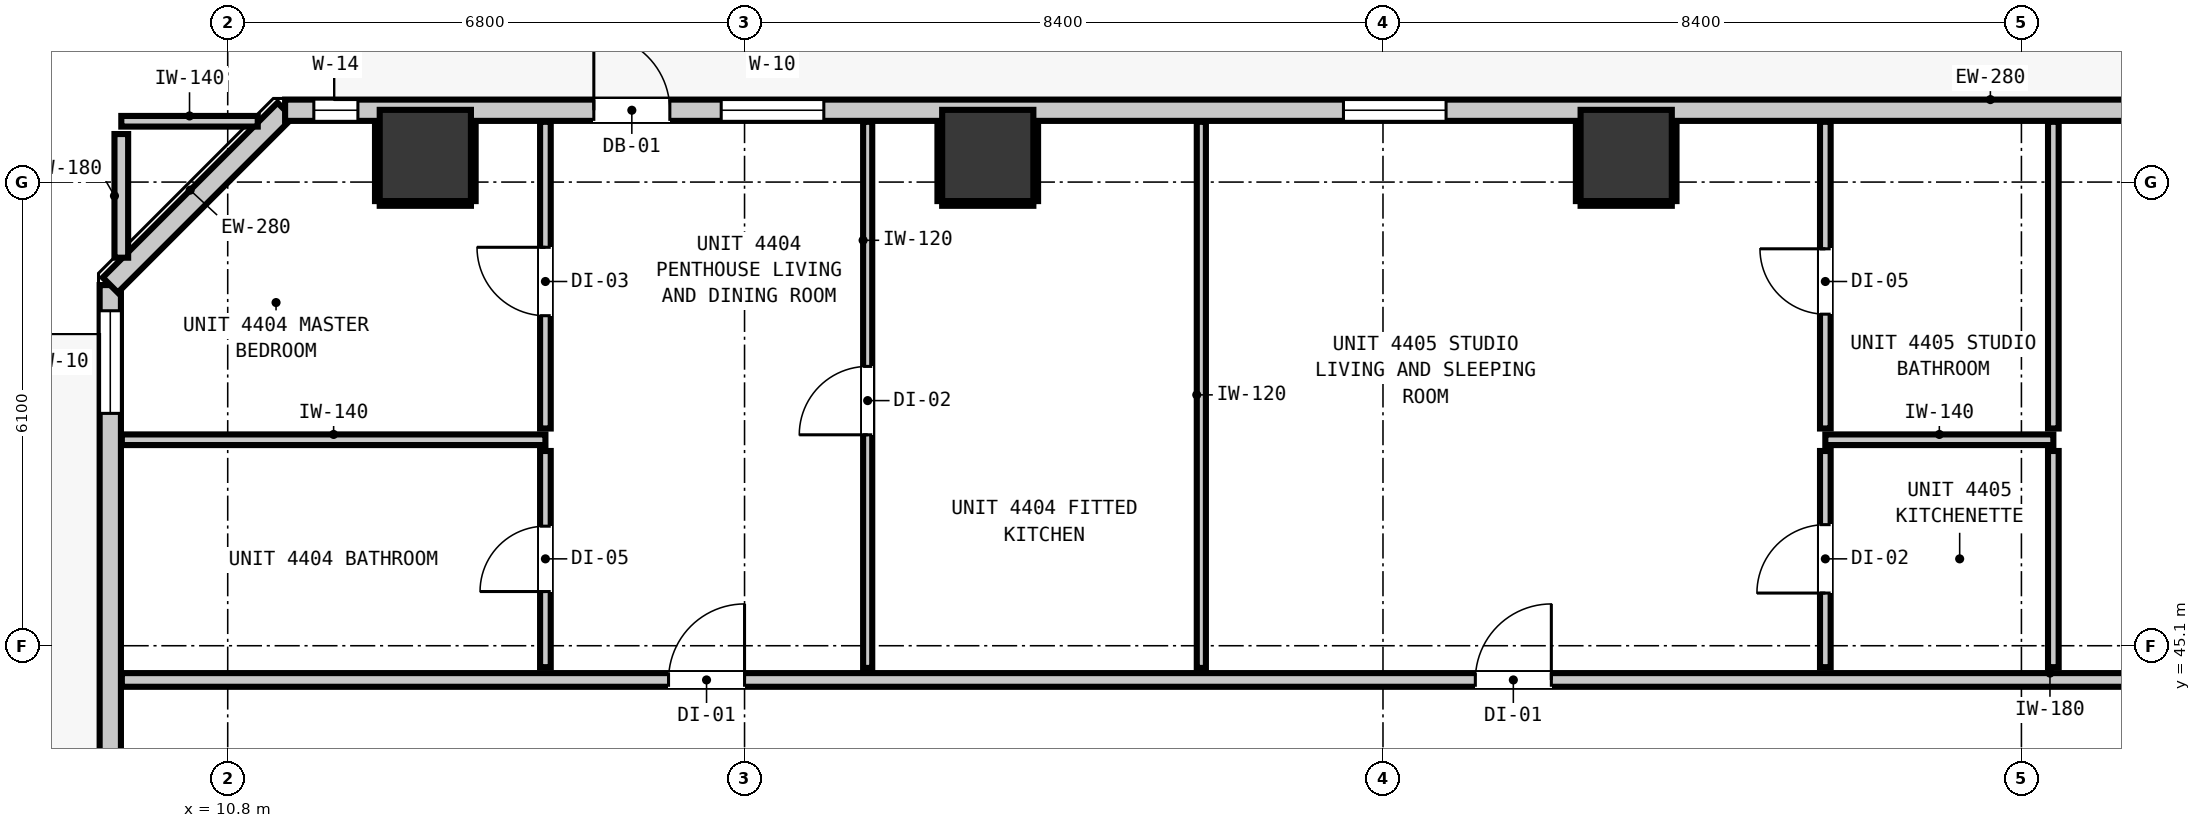
"""IFC4 building model, lengths in metres.
Left out: names, types, materials, properties, quantities, classifications, styles, units other than length and angle.
Written with IfcOpenShell. Run it as: python <this file> out.ifc"""

import sys

from ifc_helpers import new_model, si_unit, direction, frame, frame_2d, origin, origin_2d, place, context, subcontext, project, spatial, rectangle, extrude, element, fill, save


model = new_model("IFC4")
c1 = context("Model", 3, precision=1e-05, world=origin(), true_north=direction((0.0, 1.0)))
c2 = subcontext(c1, "Body", "Model", "MODEL_VIEW")
j1 = project(units=[si_unit("LENGTHUNIT", "METRE"), si_unit("PLANEANGLEUNIT", "RADIAN")], contexts=[c1])
p1 = place(None, origin())
s1 = spatial("IfcSite", under=j1, at=p1, CompositionType="ELEMENT")
p2 = place(p1, origin())
s2 = spatial("IfcBuilding", under=s1, at=p2, CompositionType="ELEMENT")
p3 = place(p2, frame((0.0, 0.0, 152.56)))
s3 = spatial("IfcBuildingStorey", under=s2, at=p3, CompositionType="ELEMENT", Elevation=152.56)
for number, where, z_axis, x_axis in (
    (1, (13.4, 51.55, 0.0), (0.0, 0.0, 1.0), (1.0, 0.0, 0.0)),
    (2, (20.8, 51.55, 0.0), (0.0, 0.0, 1.0), (1.0, 0.0, 0.0)),
    (3, (29.2, 51.55, 0.0), (0.0, 0.0, 1.0), (1.0, 0.0, 0.0)),
):
    element("IfcColumn", number, at=place(p3, frame(where, z_axis=z_axis, x_axis=x_axis)), inside=s3, PredefinedType="COLUMN", context=c2, shape_type="SweptSolid", body=[
        extrude(rectangle(XDim=1.2, YDim=1.2, at=origin_2d()), origin(), (0.0, 0.0, 1.0), 3.32),
    ])
p4 = place(p3, frame((9.255, 17.555, 0.0), z_axis=(0.0, 0.0, 1.0), x_axis=(0.0, 1.0, 0.0)))
e4 = element("IfcWall", 4, at=p4, inside=s3, PredefinedType="STANDARD", context=c2, shape_type="SweptSolid", body=[
    extrude(rectangle(XDim=32.29, YDim=0.28, at=frame_2d((16.145, 0.0))), origin(), (0.0, 0.0, 1.0), 3.08),
])
p5 = place(p4, frame((5.467, 0.0, 0.0)))
e5 = element("IfcOpeningElement", 5, at=p5, cuts=e4, PredefinedType="OPENING", context=c2, shape_type="SweptSolid", body=[
    extrude(rectangle(XDim=1.0, YDim=2.15, at=frame_2d((0.5, 1.075))), frame((0.0, 0.15, 0.0), z_axis=(0.0, -1.0, 0.0), x_axis=(1.0, 0.0, 0.0)), (0.0, 0.0, 1.0), 0.3),
])
p6 = place(p4, frame((30.602, 0.0, 0.85)))
e6 = element("IfcOpeningElement", 6, at=p6, cuts=e4, PredefinedType="OPENING", context=c2, shape_type="SweptSolid", body=[
    extrude(rectangle(XDim=1.35, YDim=1.85, at=frame_2d((0.675, 0.925))), frame((0.0, 0.15, 0.0), z_axis=(0.0, -1.0, 0.0), x_axis=(1.0, 0.0, 0.0)), (0.0, 0.0, 1.0), 0.3),
])
p7 = place(p3, frame((9.255, 49.845, 0.0), z_axis=(0.0, 0.0, 1.0), x_axis=(0.707106781187, 0.707106781187, 0.0)))
e7 = element("IfcWall", 7, at=p7, inside=s3, PredefinedType="STANDARD", context=c2, shape_type="SweptSolid", body=[
    extrude(rectangle(XDim=3.253, YDim=0.28, at=frame_2d((1.626, 0.0))), origin(), (0.0, 0.0, 1.0), 3.08),
])
p8 = place(p3, frame((11.555, 52.145, 0.0), z_axis=(0.0, 0.0, 1.0), x_axis=(1.0, 0.0, 0.0)))
e8 = element("IfcWall", 8, at=p8, inside=s3, PredefinedType="STANDARD", context=c2, shape_type="SweptSolid", body=[
    extrude(rectangle(XDim=35.09, YDim=0.28, at=frame_2d((17.545, 0.0))), origin(), (0.0, 0.0, 1.0), 3.08),
])
p9 = place(p8, frame((4.062, 0.0, 0.0)))
e9 = element("IfcOpeningElement", 9, at=p9, cuts=e8, PredefinedType="OPENING", context=c2, shape_type="SweptSolid", body=[
    extrude(rectangle(XDim=1.0, YDim=2.15, at=frame_2d((0.5, 1.075))), frame((0.0, 0.15, 0.0), z_axis=(0.0, -1.0, 0.0), x_axis=(1.0, 0.0, 0.0)), (0.0, 0.0, 1.0), 0.3),
])
p10 = place(p8, frame((5.738, 0.0, 0.85)))
e10 = element("IfcOpeningElement", 10, at=p10, cuts=e8, PredefinedType="OPENING", context=c2, shape_type="SweptSolid", body=[
    extrude(rectangle(XDim=1.35, YDim=1.85, at=frame_2d((0.675, 0.925))), frame((0.0, 0.15, 0.0), z_axis=(0.0, -1.0, 0.0), x_axis=(1.0, 0.0, 0.0)), (0.0, 0.0, 1.0), 0.3),
])
p11 = place(p8, frame((0.378, 0.0, 0.85)))
e11 = element("IfcOpeningElement", 11, at=p11, cuts=e8, PredefinedType="OPENING", context=c2, shape_type="SweptSolid", body=[
    extrude(rectangle(XDim=0.58, YDim=1.5, at=frame_2d((0.29, 0.75))), frame((0.0, 0.15, 0.0), z_axis=(0.0, -1.0, 0.0), x_axis=(1.0, 0.0, 0.0)), (0.0, 0.0, 1.0), 0.3),
])
p12 = place(p8, frame((13.925, 0.0, 0.85)))
e12 = element("IfcOpeningElement", 12, at=p12, cuts=e8, PredefinedType="OPENING", context=c2, shape_type="SweptSolid", body=[
    extrude(rectangle(XDim=1.35, YDim=1.85, at=frame_2d((0.675, 0.925))), frame((0.0, 0.15, 0.0), z_axis=(0.0, -1.0, 0.0), x_axis=(1.0, 0.0, 0.0)), (0.0, 0.0, 1.0), 0.3),
])
p13 = place(p8, frame((29.598, 0.0, 0.85)))
e13 = element("IfcOpeningElement", 13, at=p13, cuts=e8, PredefinedType="OPENING", context=c2, shape_type="SweptSolid", body=[
    extrude(rectangle(XDim=1.35, YDim=1.85, at=frame_2d((0.675, 0.925))), frame((0.0, 0.15, 0.0), z_axis=(0.0, -1.0, 0.0), x_axis=(1.0, 0.0, 0.0)), (0.0, 0.0, 1.0), 0.3),
])
p14 = place(p3, frame((9.407, 44.65, 0.0), z_axis=(0.0, 0.0, 1.0), x_axis=(1.0, 0.0, 0.0)))
e14 = element("IfcWall", 14, at=p14, inside=s3, PredefinedType="PARTITIONING", context=c2, shape_type="SweptSolid", body=[
    extrude(rectangle(XDim=39.386, YDim=0.18, at=frame_2d((19.693, 0.0))), origin(), (0.0, 0.0, 1.0), 3.08),
])
p15 = place(p14, frame((7.193, 0.0, 0.0)))
e15 = element("IfcOpeningElement", 15, at=p15, cuts=e14, PredefinedType="OPENING", context=c2, shape_type="SweptSolid", body=[
    extrude(rectangle(XDim=1.0, YDim=2.15, at=frame_2d((0.5, 1.075))), frame((0.0, 0.1, 0.0), z_axis=(0.0, -1.0, 0.0), x_axis=(1.0, 0.0, 0.0)), (0.0, 0.0, 1.0), 0.2),
])
p16 = place(p14, frame((17.808, 0.0, 0.0)))
e16 = element("IfcOpeningElement", 16, at=p16, cuts=e14, PredefinedType="OPENING", context=c2, shape_type="SweptSolid", body=[
    extrude(rectangle(XDim=1.0, YDim=2.15, at=frame_2d((0.5, 1.075))), frame((0.0, 0.1, 0.0), z_axis=(0.0, -1.0, 0.0), x_axis=(1.0, 0.0, 0.0)), (0.0, 0.0, 1.0), 0.2),
])
p17 = place(p14, frame((31.929, 0.0, 0.0)))
e17 = element("IfcOpeningElement", 17, at=p17, cuts=e14, PredefinedType="OPENING", context=c2, shape_type="SweptSolid", body=[
    extrude(rectangle(XDim=0.9, YDim=2.1, at=frame_2d((0.45, 1.05))), frame((0.0, 0.1, 0.0), z_axis=(0.0, -1.0, 0.0), x_axis=(1.0, 0.0, 0.0)), (0.0, 0.0, 1.0), 0.2),
])
p18 = place(p3, frame((9.407, 47.81, 0.0), z_axis=(0.0, 0.0, 1.0), x_axis=(1.0, 0.0, 0.0)))
e18 = element("IfcWall", 18, at=p18, inside=s3, PredefinedType="PARTITIONING", context=c2, shape_type="SweptSolid", body=[
    extrude(rectangle(XDim=5.573, YDim=0.14, at=frame_2d((2.787, 0.0))), origin(), (0.0, 0.0, 1.0), 3.08),
])
p19 = place(p3, frame((31.82, 47.81, 0.0), z_axis=(0.0, 0.0, 1.0), x_axis=(1.0, 0.0, 0.0)))
e19 = element("IfcWall", 19, at=p19, inside=s3, PredefinedType="PARTITIONING", context=c2, shape_type="SweptSolid", body=[
    extrude(rectangle(XDim=3.0, YDim=0.14, at=frame_2d((1.5, 0.0))), origin(), (0.0, 0.0, 1.0), 3.08),
])
p20 = place(p3, frame((9.4, 52.0, 0.0), z_axis=(0.0, 0.0, 1.0), x_axis=(1.0, 0.0, 0.0)))
e20 = element("IfcWall", 20, at=p20, inside=s3, PredefinedType="PARTITIONING", context=c2, shape_type="SweptSolid", body=[
    extrude(rectangle(XDim=1.795, YDim=0.14, at=frame_2d((0.897, 0.0))), origin(), (0.0, 0.0, 1.0), 3.08),
])
p21 = place(p3, frame((9.4, 50.205, 0.0), z_axis=(0.0, 0.0, 1.0), x_axis=(0.0, 1.0, 0.0)))
e21 = element("IfcWall", 21, at=p21, inside=s3, PredefinedType="PARTITIONING", context=c2, shape_type="SweptSolid", body=[
    extrude(rectangle(XDim=1.627, YDim=0.18, at=frame_2d((0.813, 0.0))), origin(), (0.0, 0.0, 1.0), 3.08),
])
p22 = place(p3, frame((14.98, 44.818, 0.0), z_axis=(0.0, 0.0, 1.0), x_axis=(0.0, 1.0, 0.0)))
e22 = element("IfcWall", 22, at=p22, inside=s3, PredefinedType="PARTITIONING", context=c2, shape_type="SweptSolid", body=[
    extrude(rectangle(XDim=2.844, YDim=0.14, at=frame_2d((1.422, 0.0))), origin(), (0.0, 0.0, 1.0), 3.08),
])
p23 = place(p22, frame((0.995, 0.0, 0.0)))
e23 = element("IfcOpeningElement", 23, at=p23, cuts=e22, PredefinedType="OPENING", context=c2, shape_type="SweptSolid", body=[
    extrude(rectangle(XDim=0.86, YDim=2.02, at=frame_2d((0.43, 1.01))), frame((0.0, 0.08, 0.0), z_axis=(0.0, -1.0, 0.0), x_axis=(1.0, 0.0, 0.0)), (0.0, 0.0, 1.0), 0.16),
])
p24 = place(p3, frame((14.98, 47.958, 0.0), z_axis=(0.0, 0.0, 1.0), x_axis=(0.0, 1.0, 0.0)))
e24 = element("IfcWall", 24, at=p24, inside=s3, PredefinedType="PARTITIONING", context=c2, shape_type="SweptSolid", body=[
    extrude(rectangle(XDim=4.035, YDim=0.14, at=frame_2d((2.018, 0.0))), origin(), (0.0, 0.0, 1.0), 3.08),
])
p25 = place(p24, frame((1.484, 0.0, 0.0)))
e25 = element("IfcOpeningElement", 25, at=p25, cuts=e24, PredefinedType="OPENING", context=c2, shape_type="SweptSolid", body=[
    extrude(rectangle(XDim=0.9, YDim=2.1, at=frame_2d((0.45, 1.05))), frame((0.0, 0.08, 0.0), z_axis=(0.0, -1.0, 0.0), x_axis=(1.0, 0.0, 0.0)), (0.0, 0.0, 1.0), 0.16),
])
p26 = place(p3, frame((31.82, 44.818, 0.0), z_axis=(0.0, 0.0, 1.0), x_axis=(0.0, 1.0, 0.0)))
e26 = element("IfcWall", 26, at=p26, inside=s3, PredefinedType="PARTITIONING", context=c2, shape_type="SweptSolid", body=[
    extrude(rectangle(XDim=2.844, YDim=0.14, at=frame_2d((1.422, 0.0))), origin(), (0.0, 0.0, 1.0), 3.08),
])
p27 = place(p26, frame((0.975, 0.0, 0.0)))
e27 = element("IfcOpeningElement", 27, at=p27, cuts=e26, PredefinedType="OPENING", context=c2, shape_type="SweptSolid", body=[
    extrude(rectangle(XDim=0.9, YDim=2.1, at=frame_2d((0.45, 1.05))), frame((0.0, 0.08, 0.0), z_axis=(0.0, -1.0, 0.0), x_axis=(1.0, 0.0, 0.0)), (0.0, 0.0, 1.0), 0.16),
])
p28 = place(p3, frame((31.82, 47.958, 0.0), z_axis=(0.0, 0.0, 1.0), x_axis=(0.0, 1.0, 0.0)))
e28 = element("IfcWall", 28, at=p28, inside=s3, PredefinedType="PARTITIONING", context=c2, shape_type="SweptSolid", body=[
    extrude(rectangle(XDim=4.035, YDim=0.14, at=frame_2d((2.018, 0.0))), origin(), (0.0, 0.0, 1.0), 3.08),
])
p29 = place(p28, frame((1.504, 0.0, 0.0)))
e29 = element("IfcOpeningElement", 29, at=p29, cuts=e28, PredefinedType="OPENING", context=c2, shape_type="SweptSolid", body=[
    extrude(rectangle(XDim=0.86, YDim=2.02, at=frame_2d((0.43, 1.01))), frame((0.0, 0.08, 0.0), z_axis=(0.0, -1.0, 0.0), x_axis=(1.0, 0.0, 0.0)), (0.0, 0.0, 1.0), 0.16),
])
p30 = place(p3, frame((34.82, 44.818, 0.0), z_axis=(0.0, 0.0, 1.0), x_axis=(0.0, 1.0, 0.0)))
e30 = element("IfcWall", 30, at=p30, inside=s3, PredefinedType="PARTITIONING", context=c2, shape_type="SweptSolid", body=[
    extrude(rectangle(XDim=2.844, YDim=0.14, at=frame_2d((1.422, 0.0))), origin(), (0.0, 0.0, 1.0), 3.08),
])
p31 = place(p3, frame((34.82, 47.958, 0.0), z_axis=(0.0, 0.0, 1.0), x_axis=(0.0, 1.0, 0.0)))
e31 = element("IfcWall", 31, at=p31, inside=s3, PredefinedType="PARTITIONING", context=c2, shape_type="SweptSolid", body=[
    extrude(rectangle(XDim=4.035, YDim=0.14, at=frame_2d((2.018, 0.0))), origin(), (0.0, 0.0, 1.0), 3.08),
])
p32 = place(p3, frame((19.22, 44.808, 0.0), z_axis=(0.0, 0.0, 1.0), x_axis=(0.0, 1.0, 0.0)))
e32 = element("IfcWall", 32, at=p32, inside=s3, PredefinedType="PARTITIONING", context=c2, shape_type="SweptSolid", body=[
    extrude(rectangle(XDim=7.185, YDim=0.12, at=frame_2d((3.592, 0.0))), origin(), (0.0, 0.0, 1.0), 3.08),
])
p33 = place(p32, frame((3.067, 0.0, 0.0)))
e33 = element("IfcOpeningElement", 33, at=p33, cuts=e32, PredefinedType="OPENING", context=c2, shape_type="SweptSolid", body=[
    extrude(rectangle(XDim=0.9, YDim=2.1, at=frame_2d((0.45, 1.05))), frame((0.0, 0.07, 0.0), z_axis=(0.0, -1.0, 0.0), x_axis=(1.0, 0.0, 0.0)), (0.0, 0.0, 1.0), 0.14),
])
p34 = place(p3, frame((23.61, 44.808, 0.0), z_axis=(0.0, 0.0, 1.0), x_axis=(0.0, 1.0, 0.0)))
e34 = element("IfcWall", 34, at=p34, inside=s3, PredefinedType="PARTITIONING", context=c2, shape_type="SweptSolid", body=[
    extrude(rectangle(XDim=7.185, YDim=0.12, at=frame_2d((3.592, 0.0))), origin(), (0.0, 0.0, 1.0), 3.08),
])
p35 = place(p3, frame((12.8, 50.918, 0.0), z_axis=(0.0, 0.0, 1.0), x_axis=(1.0, 0.0, 0.0)))
e35 = element("IfcWall", 35, at=p35, inside=s3, PredefinedType="PARTITIONING", context=c2, shape_type="SweptSolid", body=[
    extrude(rectangle(XDim=1.2, YDim=0.06, at=frame_2d((0.6, 0.0))), origin(), (0.0, 0.0, 1.0), 1.45),
])
for number, where, z_axis, x_axis in (
    (36, (12.768, 50.95, 0.0), (0.0, 0.0, 1.0), (0.0, 1.0, 0.0)),
    (37, (14.032, 50.95, 0.0), (0.0, 0.0, 1.0), (0.0, 1.0, 0.0)),
):
    element("IfcWall", number, at=place(p3, frame(where, z_axis=z_axis, x_axis=x_axis)), inside=s3, PredefinedType="PARTITIONING", context=c2, shape_type="SweptSolid", body=[
        extrude(rectangle(XDim=1.04, YDim=0.06, at=frame_2d((0.52, 0.0))), origin(), (0.0, 0.0, 1.0), 1.45),
    ])
p36 = place(p3, frame((20.2, 50.918, 0.0), z_axis=(0.0, 0.0, 1.0), x_axis=(1.0, 0.0, 0.0)))
e38 = element("IfcWall", 38, at=p36, inside=s3, PredefinedType="PARTITIONING", context=c2, shape_type="SweptSolid", body=[
    extrude(rectangle(XDim=1.2, YDim=0.06, at=frame_2d((0.6, 0.0))), origin(), (0.0, 0.0, 1.0), 1.45),
])
for number, where, z_axis, x_axis in (
    (39, (20.168, 50.95, 0.0), (0.0, 0.0, 1.0), (0.0, 1.0, 0.0)),
    (40, (21.432, 50.95, 0.0), (0.0, 0.0, 1.0), (0.0, 1.0, 0.0)),
):
    element("IfcWall", number, at=place(p3, frame(where, z_axis=z_axis, x_axis=x_axis)), inside=s3, PredefinedType="PARTITIONING", context=c2, shape_type="SweptSolid", body=[
        extrude(rectangle(XDim=1.04, YDim=0.06, at=frame_2d((0.52, 0.0))), origin(), (0.0, 0.0, 1.0), 1.45),
    ])
p37 = place(p3, frame((28.6, 50.918, 0.0), z_axis=(0.0, 0.0, 1.0), x_axis=(1.0, 0.0, 0.0)))
e41 = element("IfcWall", 41, at=p37, inside=s3, PredefinedType="PARTITIONING", context=c2, shape_type="SweptSolid", body=[
    extrude(rectangle(XDim=1.2, YDim=0.06, at=frame_2d((0.6, 0.0))), origin(), (0.0, 0.0, 1.0), 1.45),
])
for number, where, z_axis, x_axis in (
    (42, (28.568, 50.95, 0.0), (0.0, 0.0, 1.0), (0.0, 1.0, 0.0)),
    (43, (29.832, 50.95, 0.0), (0.0, 0.0, 1.0), (0.0, 1.0, 0.0)),
):
    element("IfcWall", number, at=place(p3, frame(where, z_axis=z_axis, x_axis=x_axis)), inside=s3, PredefinedType="PARTITIONING", context=c2, shape_type="SweptSolid", body=[
        extrude(rectangle(XDim=1.04, YDim=0.06, at=frame_2d((0.52, 0.0))), origin(), (0.0, 0.0, 1.0), 1.45),
    ])
p38 = place(p9, origin())
e44 = element("IfcDoor", 44, at=p38, inside=s3, OperationType="SINGLE_SWING_LEFT", PredefinedType="DOOR", context=c2, shape_type="SweptSolid", body=[
    extrude(rectangle(XDim=1.0, YDim=2.15, at=frame_2d((0.5, 1.075))), frame((0.0, 0.025, 0.0), z_axis=(0.0, -1.0, 0.0), x_axis=(1.0, 0.0, 0.0)), (0.0, 0.0, 1.0), 0.05),
])
fill(e9, e44)
p39 = place(p6, origin())
e45 = element("IfcWindow", 45, at=p39, inside=s3, PartitioningType="SINGLE_PANEL", PredefinedType="WINDOW", context=c2, shape_type="SweptSolid", body=[
    extrude(rectangle(XDim=1.35, YDim=1.85, at=frame_2d((0.675, 0.925))), frame((0.0, 0.03, 0.0), z_axis=(0.0, -1.0, 0.0), x_axis=(1.0, 0.0, 0.0)), (0.0, 0.0, 1.0), 0.06),
])
fill(e6, e45)
p40 = place(p10, origin())
e46 = element("IfcWindow", 46, at=p40, inside=s3, PartitioningType="SINGLE_PANEL", PredefinedType="WINDOW", context=c2, shape_type="SweptSolid", body=[
    extrude(rectangle(XDim=1.35, YDim=1.85, at=frame_2d((0.675, 0.925))), frame((0.0, 0.03, 0.0), z_axis=(0.0, -1.0, 0.0), x_axis=(1.0, 0.0, 0.0)), (0.0, 0.0, 1.0), 0.06),
])
fill(e10, e46)
p41 = place(p11, origin())
e47 = element("IfcWindow", 47, at=p41, inside=s3, PartitioningType="SINGLE_PANEL", PredefinedType="WINDOW", context=c2, shape_type="SweptSolid", body=[
    extrude(rectangle(XDim=0.58, YDim=1.5, at=frame_2d((0.29, 0.75))), frame((0.0, 0.03, 0.0), z_axis=(0.0, -1.0, 0.0), x_axis=(1.0, 0.0, 0.0)), (0.0, 0.0, 1.0), 0.06),
])
fill(e11, e47)
p42 = place(p12, origin())
e48 = element("IfcWindow", 48, at=p42, inside=s3, PartitioningType="SINGLE_PANEL", PredefinedType="WINDOW", context=c2, shape_type="SweptSolid", body=[
    extrude(rectangle(XDim=1.35, YDim=1.85, at=frame_2d((0.675, 0.925))), frame((0.0, 0.03, 0.0), z_axis=(0.0, -1.0, 0.0), x_axis=(1.0, 0.0, 0.0)), (0.0, 0.0, 1.0), 0.06),
])
fill(e12, e48)
p43 = place(p15, origin())
e49 = element("IfcDoor", 49, at=p43, inside=s3, OperationType="SINGLE_SWING_RIGHT", PredefinedType="DOOR", context=c2, shape_type="SweptSolid", body=[
    extrude(rectangle(XDim=1.0, YDim=2.15, at=frame_2d((0.5, 1.075))), frame((0.0, 0.025, 0.0), z_axis=(0.0, -1.0, 0.0), x_axis=(1.0, 0.0, 0.0)), (0.0, 0.0, 1.0), 0.05),
])
fill(e15, e49)
p44 = place(p23, origin())
e50 = element("IfcDoor", 50, at=p44, inside=s3, OperationType="SINGLE_SWING_LEFT", PredefinedType="DOOR", context=c2, shape_type="SweptSolid", body=[
    extrude(rectangle(XDim=0.86, YDim=2.02, at=frame_2d((0.43, 1.01))), frame((0.0, 0.025, 0.0), z_axis=(0.0, -1.0, 0.0), x_axis=(1.0, 0.0, 0.0)), (0.0, 0.0, 1.0), 0.05),
])
fill(e23, e50)
p45 = place(p25, origin())
e51 = element("IfcDoor", 51, at=p45, inside=s3, OperationType="SINGLE_SWING_RIGHT", PredefinedType="DOOR", context=c2, shape_type="SweptSolid", body=[
    extrude(rectangle(XDim=0.9, YDim=2.1, at=frame_2d((0.45, 1.05))), frame((0.0, 0.025, 0.0), z_axis=(0.0, -1.0, 0.0), x_axis=(1.0, 0.0, 0.0)), (0.0, 0.0, 1.0), 0.05),
])
fill(e25, e51)
p46 = place(p33, origin())
e52 = element("IfcDoor", 52, at=p46, inside=s3, OperationType="SINGLE_SWING_LEFT", PredefinedType="DOOR", context=c2, shape_type="SweptSolid", body=[
    extrude(rectangle(XDim=0.9, YDim=2.1, at=frame_2d((0.45, 1.05))), frame((0.0, 0.025, 0.0), z_axis=(0.0, -1.0, 0.0), x_axis=(1.0, 0.0, 0.0)), (0.0, 0.0, 1.0), 0.05),
])
fill(e33, e52)
p47 = place(p16, origin())
e53 = element("IfcDoor", 53, at=p47, inside=s3, OperationType="SINGLE_SWING_RIGHT", PredefinedType="DOOR", context=c2, shape_type="SweptSolid", body=[
    extrude(rectangle(XDim=1.0, YDim=2.15, at=frame_2d((0.5, 1.075))), frame((0.0, 0.025, 0.0), z_axis=(0.0, -1.0, 0.0), x_axis=(1.0, 0.0, 0.0)), (0.0, 0.0, 1.0), 0.05),
])
fill(e16, e53)
p48 = place(p27, origin())
e54 = element("IfcDoor", 54, at=p48, inside=s3, OperationType="SINGLE_SWING_LEFT", PredefinedType="DOOR", context=c2, shape_type="SweptSolid", body=[
    extrude(rectangle(XDim=0.9, YDim=2.1, at=frame_2d((0.45, 1.05))), frame((0.0, 0.025, 0.0), z_axis=(0.0, -1.0, 0.0), x_axis=(1.0, 0.0, 0.0)), (0.0, 0.0, 1.0), 0.05),
])
fill(e27, e54)
p49 = place(p29, origin())
e55 = element("IfcDoor", 55, at=p49, inside=s3, OperationType="SINGLE_SWING_RIGHT", PredefinedType="DOOR", context=c2, shape_type="SweptSolid", body=[
    extrude(rectangle(XDim=0.86, YDim=2.02, at=frame_2d((0.43, 1.01))), frame((0.0, 0.025, 0.0), z_axis=(0.0, -1.0, 0.0), x_axis=(1.0, 0.0, 0.0)), (0.0, 0.0, 1.0), 0.05),
])
fill(e29, e55)
save(model, sys.argv[1])
